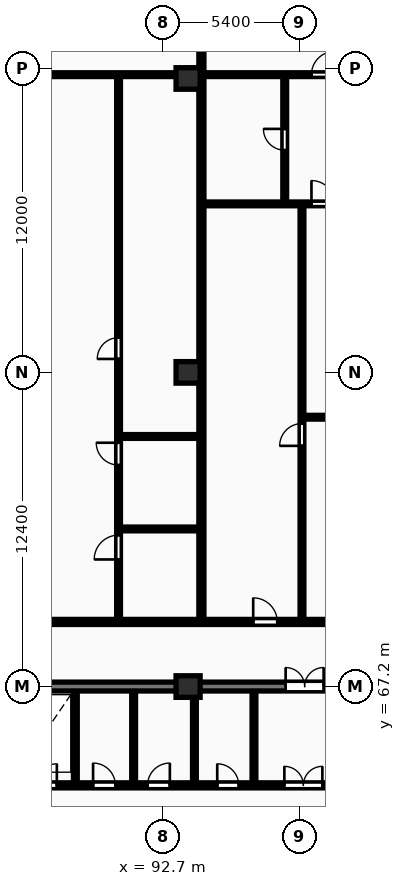
"""IFC4 building model, lengths in metres.
Left out: names, types, materials, properties, quantities, classifications, styles, units other than length and angle.
Written with IfcOpenShell. Run it as: python <this file> out.ifc"""

import sys

from ifc_helpers import new_model, si_unit, direction, frame, frame_2d, origin, origin_2d, place, context, subcontext, project, spatial, rectangle, extrude, element, fill, save


model = new_model("IFC4")
c1 = context("Model", 3, precision=1e-05, world=origin(), true_north=direction((0.0, 1.0)))
c2 = subcontext(c1, "Body", "Model", "MODEL_VIEW")
j1 = project(units=[si_unit("LENGTHUNIT", "METRE"), si_unit("PLANEANGLEUNIT", "RADIAN")], contexts=[c1])
p1 = place(None, origin())
s1 = spatial("IfcSite", under=j1, at=p1, CompositionType="ELEMENT")
p2 = place(p1, origin())
s2 = spatial("IfcBuilding", under=s1, at=p2, CompositionType="ELEMENT")
p3 = place(p2, frame((0.0, 0.0, 100.3)))
s3 = spatial("IfcBuildingStorey", under=s2, at=p3, CompositionType="ELEMENT", Elevation=100.3)
for number, where, z_axis, x_axis in (
    (1, (93.7, 67.2, 0.0), (0.0, 0.0, 1.0), (1.0, 0.0, 0.0)),
    (2, (93.7, 79.6, 0.0), (0.0, 0.0, 1.0), (1.0, 0.0, 0.0)),
    (3, (93.7, 91.2, 0.0), (0.0, 0.0, 1.0), (1.0, 0.0, 0.0)),
):
    element("IfcColumn", number, at=place(p3, frame(where, z_axis=z_axis, x_axis=x_axis)), inside=s3, PredefinedType="COLUMN", context=c2, shape_type="SweptSolid", body=[
        extrude(rectangle(XDim=0.95, YDim=0.85, at=origin_2d()), origin(), (0.0, 0.0, 1.0), 3.25),
    ])
p4 = place(p3, frame((75.95, 67.2, 0.0), z_axis=(0.0, 0.0, 1.0), x_axis=(1.0, 0.0, 0.0)))
e4 = element("IfcWall", 4, at=p4, inside=s3, PredefinedType="SHEAR", context=c2, shape_type="SweptSolid", body=[
    extrude(rectangle(XDim=36.3, YDim=0.35, at=frame_2d((18.15, 0.0))), origin(), (0.0, 0.0, 1.0), 3.25),
])
p5 = place(p4, frame((5.25, 0.0, 0.0)))
e5 = element("IfcOpeningElement", 5, at=p5, cuts=e4, PredefinedType="OPENING", context=c2, shape_type="SweptSolid", body=[
    extrude(rectangle(XDim=1.0, YDim=2.15, at=frame_2d((0.5, 1.075))), frame((0.0, 0.185, 0.0), z_axis=(0.0, -1.0, 0.0), x_axis=(1.0, 0.0, 0.0)), (0.0, 0.0, 1.0), 0.37),
])
p6 = place(p4, frame((21.6, 0.0, 0.0)))
e6 = element("IfcOpeningElement", 6, at=p6, cuts=e4, PredefinedType="OPENING", context=c2, shape_type="SweptSolid", body=[
    extrude(rectangle(XDim=1.5, YDim=2.2, at=frame_2d((0.75, 1.1))), frame((0.0, 0.185, 0.0), z_axis=(0.0, -1.0, 0.0), x_axis=(1.0, 0.0, 0.0)), (0.0, 0.0, 1.0), 0.37),
])
p7 = place(p4, frame((30.45, 0.0, 0.0)))
e7 = element("IfcOpeningElement", 7, at=p7, cuts=e4, PredefinedType="OPENING", context=c2, shape_type="SweptSolid", body=[
    extrude(rectangle(XDim=1.0, YDim=2.15, at=frame_2d((0.5, 1.075))), frame((0.0, 0.185, 0.0), z_axis=(0.0, -1.0, 0.0), x_axis=(1.0, 0.0, 0.0)), (0.0, 0.0, 1.0), 0.37),
])
for number, where, z_axis, x_axis in (
    (8, (89.25, 63.4, 0.0), (0.0, 0.0, 1.0), (0.0, 1.0, 0.0)),
    (9, (91.55, 63.4, 0.0), (0.0, 0.0, 1.0), (0.0, 1.0, 0.0)),
):
    element("IfcWall", number, at=place(p3, frame(where, z_axis=z_axis, x_axis=x_axis)), inside=s3, PredefinedType="PARTITIONING", context=c2, shape_type="SweptSolid", body=[
        extrude(rectangle(XDim=3.6, YDim=0.15, at=frame_2d((1.8, 0.0))), origin(), (0.0, 0.0, 1.0), 2.97),
    ])
p8 = place(p3, frame((93.95, 63.4, 0.0), z_axis=(0.0, 0.0, 1.0), x_axis=(0.0, 1.0, 0.0)))
e10 = element("IfcWall", 10, at=p8, inside=s3, PredefinedType="PARTITIONING", context=c2, shape_type="SweptSolid", body=[
    extrude(rectangle(XDim=3.6, YDim=0.15, at=frame_2d((1.8, 0.0))), origin(), (0.0, 0.0, 1.0), 2.277),
])
p9 = place(p3, frame((96.3, 63.4, 0.0), z_axis=(0.0, 0.0, 1.0), x_axis=(0.0, 1.0, 0.0)))
e11 = element("IfcWall", 11, at=p9, inside=s3, PredefinedType="PARTITIONING", context=c2, shape_type="SweptSolid", body=[
    extrude(rectangle(XDim=3.6, YDim=0.15, at=frame_2d((1.8, 0.0))), origin(), (0.0, 0.0, 1.0), 2.97),
])
p10 = place(p3, frame((84.42, 63.3, 0.0), z_axis=(0.0, 0.0, 1.0), x_axis=(1.0, 0.0, 0.0)))
e12 = element("IfcWall", 12, at=p10, inside=s3, PredefinedType="PARTITIONING", context=c2, shape_type="SweptSolid", body=[
    extrude(rectangle(XDim=19.83, YDim=0.2, at=frame_2d((9.915, 0.0))), origin(), (0.0, 0.0, 1.0), 2.97),
])
p11 = place(p10, frame((1.15, 0.0, 0.0)))
e13 = element("IfcOpeningElement", 13, at=p11, cuts=e12, PredefinedType="OPENING", context=c2, shape_type="SweptSolid", body=[
    extrude(rectangle(XDim=0.85, YDim=2.05, at=frame_2d((0.425, 1.025))), frame((0.0, 0.11, 0.0), z_axis=(0.0, -1.0, 0.0), x_axis=(1.0, 0.0, 0.0)), (0.0, 0.0, 1.0), 0.22),
])
p12 = place(p10, frame((3.25, 0.0, 0.0)))
e14 = element("IfcOpeningElement", 14, at=p12, cuts=e12, PredefinedType="OPENING", context=c2, shape_type="SweptSolid", body=[
    extrude(rectangle(XDim=0.85, YDim=2.05, at=frame_2d((0.425, 1.025))), frame((0.0, 0.11, 0.0), z_axis=(0.0, -1.0, 0.0), x_axis=(1.0, 0.0, 0.0)), (0.0, 0.0, 1.0), 0.22),
])
p13 = place(p10, frame((13.08, 0.0, 0.0)))
e15 = element("IfcOpeningElement", 15, at=p13, cuts=e12, PredefinedType="OPENING", context=c2, shape_type="SweptSolid", body=[
    extrude(rectangle(XDim=1.5, YDim=2.2, at=frame_2d((0.75, 1.1))), frame((0.0, 0.11, 0.0), z_axis=(0.0, -1.0, 0.0), x_axis=(1.0, 0.0, 0.0)), (0.0, 0.0, 1.0), 0.22),
])
p14 = place(p10, frame((5.53, 0.0, 0.0)))
e16 = element("IfcOpeningElement", 16, at=p14, cuts=e12, PredefinedType="OPENING", context=c2, shape_type="SweptSolid", body=[
    extrude(rectangle(XDim=0.88, YDim=2.06, at=frame_2d((0.44, 1.03))), frame((0.0, 0.11, 0.0), z_axis=(0.0, -1.0, 0.0), x_axis=(1.0, 0.0, 0.0)), (0.0, 0.0, 1.0), 0.22),
])
p15 = place(p10, frame((7.68, 0.0, 0.0)))
e17 = element("IfcOpeningElement", 17, at=p15, cuts=e12, PredefinedType="OPENING", context=c2, shape_type="SweptSolid", body=[
    extrude(rectangle(XDim=0.88, YDim=2.06, at=frame_2d((0.44, 1.03))), frame((0.0, 0.11, 0.0), z_axis=(0.0, -1.0, 0.0), x_axis=(1.0, 0.0, 0.0)), (0.0, 0.0, 1.0), 0.22),
])
p16 = place(p10, frame((10.43, 0.0, 0.0)))
e18 = element("IfcOpeningElement", 18, at=p16, cuts=e12, PredefinedType="OPENING", context=c2, shape_type="SweptSolid", body=[
    extrude(rectangle(XDim=0.85, YDim=2.05, at=frame_2d((0.425, 1.025))), frame((0.0, 0.11, 0.0), z_axis=(0.0, -1.0, 0.0), x_axis=(1.0, 0.0, 0.0)), (0.0, 0.0, 1.0), 0.22),
])
p17 = place(p10, frame((16.23, 0.0, 0.0)))
e19 = element("IfcOpeningElement", 19, at=p17, cuts=e12, PredefinedType="OPENING", context=c2, shape_type="SweptSolid", body=[
    extrude(rectangle(XDim=0.96, YDim=2.1, at=frame_2d((0.48, 1.05))), frame((0.0, 0.11, 0.0), z_axis=(0.0, -1.0, 0.0), x_axis=(1.0, 0.0, 0.0)), (0.0, 0.0, 1.0), 0.22),
])
p18 = place(p10, frame((18.68, 0.0, 0.0)))
e20 = element("IfcOpeningElement", 20, at=p18, cuts=e12, PredefinedType="OPENING", context=c2, shape_type="SweptSolid", body=[
    extrude(rectangle(XDim=0.84, YDim=2.04, at=frame_2d((0.42, 1.02))), frame((0.0, 0.11, 0.0), z_axis=(0.0, -1.0, 0.0), x_axis=(1.0, 0.0, 0.0)), (0.0, 0.0, 1.0), 0.22),
])
p19 = place(p3, frame((94.225, 69.83, 0.0), z_axis=(0.0, 0.0, 1.0), x_axis=(0.0, 1.0, 0.0)))
e21 = element("IfcWall", 21, at=p19, inside=s3, PredefinedType="PARTITIONING", context=c2, shape_type="SweptSolid", body=[
    extrude(rectangle(XDim=26.07, YDim=0.2, at=frame_2d((13.035, 0.0))), origin(), (0.0, 0.0, 1.0), 2.97),
])
for number, where, z_axis, x_axis in (
    (22, (91.015, 73.42, 0.0), (0.0, 0.0, 1.0), (1.0, 0.0, 0.0)),
    (23, (91.015, 77.07, 0.0), (0.0, 0.0, 1.0), (1.0, 0.0, 0.0)),
):
    element("IfcWall", number, at=place(p3, frame(where, z_axis=z_axis, x_axis=x_axis)), inside=s3, PredefinedType="PARTITIONING", context=c2, shape_type="SweptSolid", body=[
        extrude(rectangle(XDim=3.13, YDim=0.15, at=frame_2d((1.565, 0.0))), origin(), (0.0, 0.0, 1.0), 2.97),
    ])
p20 = place(p3, frame((90.955, 69.81, 0.0), z_axis=(0.0, 0.0, 1.0), x_axis=(0.0, 1.0, 0.0)))
e24 = element("IfcWall", 24, at=p20, inside=s3, PredefinedType="PARTITIONING", context=c2, shape_type="SweptSolid", body=[
    extrude(rectangle(XDim=21.48, YDim=0.15, at=frame_2d((10.74, 0.0))), origin(), (0.0, 0.0, 1.0), 2.97),
])
p21 = place(p20, frame((2.406, 0.0, 0.0)))
e25 = element("IfcOpeningElement", 25, at=p21, cuts=e24, PredefinedType="OPENING", context=c2, shape_type="SweptSolid", body=[
    extrude(rectangle(XDim=0.96, YDim=2.1, at=frame_2d((0.48, 1.05))), frame((0.0, 0.085, 0.0), z_axis=(0.0, -1.0, 0.0), x_axis=(1.0, 0.0, 0.0)), (0.0, 0.0, 1.0), 0.17),
])
p22 = place(p20, frame((6.133, 0.0, 0.0)))
e26 = element("IfcOpeningElement", 26, at=p22, cuts=e24, PredefinedType="OPENING", context=c2, shape_type="SweptSolid", body=[
    extrude(rectangle(XDim=0.88, YDim=2.06, at=frame_2d((0.44, 1.03))), frame((0.0, 0.085, 0.0), z_axis=(0.0, -1.0, 0.0), x_axis=(1.0, 0.0, 0.0)), (0.0, 0.0, 1.0), 0.17),
])
p23 = place(p20, frame((10.32, 0.0, 0.0)))
e27 = element("IfcOpeningElement", 27, at=p23, cuts=e24, PredefinedType="OPENING", context=c2, shape_type="SweptSolid", body=[
    extrude(rectangle(XDim=0.84, YDim=2.04, at=frame_2d((0.42, 1.02))), frame((0.0, 0.085, 0.0), z_axis=(0.0, -1.0, 0.0), x_axis=(1.0, 0.0, 0.0)), (0.0, 0.0, 1.0), 0.17),
])
p24 = place(p3, frame((75.712, 91.35, 0.0), z_axis=(0.0, 0.0, 1.0), x_axis=(1.0, 0.0, 0.0)))
e28 = element("IfcWall", 28, at=p24, inside=s3, PredefinedType="PARTITIONING", context=c2, shape_type="SweptSolid", body=[
    extrude(rectangle(XDim=18.433, YDim=0.15, at=frame_2d((9.216, 0.0))), origin(), (0.0, 0.0, 1.0), 2.663),
])
p25 = place(p24, frame((6.074, 0.0, 0.0)))
e29 = element("IfcOpeningElement", 29, at=p25, cuts=e28, PredefinedType="OPENING", context=c2, shape_type="SweptSolid", body=[
    extrude(rectangle(XDim=0.94, YDim=2.1, at=frame_2d((0.47, 1.05))), frame((0.0, 0.085, 0.0), z_axis=(0.0, -1.0, 0.0), x_axis=(1.0, 0.0, 0.0)), (0.0, 0.0, 1.0), 0.17),
])
p26 = place(p24, frame((10.518, 0.0, 0.0)))
e30 = element("IfcOpeningElement", 30, at=p26, cuts=e28, PredefinedType="OPENING", context=c2, shape_type="SweptSolid", body=[
    extrude(rectangle(XDim=0.94, YDim=2.1, at=frame_2d((0.47, 1.05))), frame((0.0, 0.085, 0.0), z_axis=(0.0, -1.0, 0.0), x_axis=(1.0, 0.0, 0.0)), (0.0, 0.0, 1.0), 0.17),
])
p27 = place(p3, frame((98.255, 77.83, 0.0), z_axis=(0.0, 0.0, 1.0), x_axis=(1.0, 0.0, 0.0)))
e31 = element("IfcWall", 31, at=p27, inside=s3, PredefinedType="PARTITIONING", context=c2, shape_type="SweptSolid", body=[
    extrude(rectangle(XDim=5.499, YDim=0.15, at=frame_2d((2.75, 0.0))), origin(), (0.0, 0.0, 1.0), 2.97),
])
p28 = place(p27, frame((2.074, 0.0, 0.0)))
e32 = element("IfcOpeningElement", 32, at=p28, cuts=e31, PredefinedType="OPENING", context=c2, shape_type="SweptSolid", body=[
    extrude(rectangle(XDim=0.88, YDim=2.06, at=frame_2d((0.44, 1.03))), frame((0.0, 0.085, 0.0), z_axis=(0.0, -1.0, 0.0), x_axis=(1.0, 0.0, 0.0)), (0.0, 0.0, 1.0), 0.17),
])
p29 = place(p3, frame((98.195, 69.81, 0.0), z_axis=(0.0, 0.0, 1.0), x_axis=(0.0, 1.0, 0.0)))
e33 = element("IfcWall", 33, at=p29, inside=s3, PredefinedType="PARTITIONING", context=c2, shape_type="SweptSolid", body=[
    extrude(rectangle(XDim=16.4, YDim=0.15, at=frame_2d((8.2, 0.0))), origin(), (0.0, 0.0, 1.0), 2.97),
])
p30 = place(p29, frame((6.89, 0.0, 0.0)))
e34 = element("IfcOpeningElement", 34, at=p30, cuts=e33, PredefinedType="OPENING", context=c2, shape_type="SweptSolid", body=[
    extrude(rectangle(XDim=0.88, YDim=2.06, at=frame_2d((0.44, 1.03))), frame((0.0, 0.085, 0.0), z_axis=(0.0, -1.0, 0.0), x_axis=(1.0, 0.0, 0.0)), (0.0, 0.0, 1.0), 0.17),
])
p31 = place(p3, frame((97.514, 86.29, 0.0), z_axis=(0.0, 0.0, 1.0), x_axis=(0.0, 1.0, 0.0)))
e35 = element("IfcWall", 35, at=p31, inside=s3, PredefinedType="PARTITIONING", context=c2, shape_type="SweptSolid", body=[
    extrude(rectangle(XDim=5.0, YDim=0.15, at=frame_2d((2.5, 0.0))), origin(), (0.0, 0.0, 1.0), 2.97),
])
p32 = place(p31, frame((2.08, 0.0, 0.0)))
e36 = element("IfcOpeningElement", 36, at=p32, cuts=e35, PredefinedType="OPENING", context=c2, shape_type="SweptSolid", body=[
    extrude(rectangle(XDim=0.84, YDim=2.04, at=frame_2d((0.42, 1.02))), frame((0.0, 0.085, 0.0), z_axis=(0.0, -1.0, 0.0), x_axis=(1.0, 0.0, 0.0)), (0.0, 0.0, 1.0), 0.17),
])
p33 = place(p3, frame((94.305, 86.25, 0.0), z_axis=(0.0, 0.0, 1.0), x_axis=(1.0, 0.0, 0.0)))
e37 = element("IfcWall", 37, at=p33, inside=s3, PredefinedType="PARTITIONING", context=c2, shape_type="SweptSolid", body=[
    extrude(rectangle(XDim=9.449, YDim=0.15, at=frame_2d((4.725, 0.0))), origin(), (0.0, 0.0, 1.0), 2.97),
])
p34 = place(p33, frame((4.264, 0.0, 0.0)))
e38 = element("IfcOpeningElement", 38, at=p34, cuts=e37, PredefinedType="OPENING", context=c2, shape_type="SweptSolid", body=[
    extrude(rectangle(XDim=0.92, YDim=2.08, at=frame_2d((0.46, 1.04))), frame((0.0, 0.085, 0.0), z_axis=(0.0, -1.0, 0.0), x_axis=(1.0, 0.0, 0.0)), (0.0, 0.0, 1.0), 0.17),
])
p35 = place(p3, frame((94.305, 91.35, 0.0), z_axis=(0.0, 0.0, 1.0), x_axis=(1.0, 0.0, 0.0)))
e39 = element("IfcWall", 39, at=p35, inside=s3, PredefinedType="PARTITIONING", context=c2, shape_type="SweptSolid", body=[
    extrude(rectangle(XDim=9.449, YDim=0.15, at=frame_2d((4.725, 0.0))), origin(), (0.0, 0.0, 1.0), 2.663),
])
p36 = place(p35, frame((4.264, 0.0, 0.0)))
e40 = element("IfcOpeningElement", 40, at=p36, cuts=e39, PredefinedType="OPENING", context=c2, shape_type="SweptSolid", body=[
    extrude(rectangle(XDim=0.92, YDim=2.08, at=frame_2d((0.46, 1.04))), frame((0.0, 0.085, 0.0), z_axis=(0.0, -1.0, 0.0), x_axis=(1.0, 0.0, 0.0)), (0.0, 0.0, 1.0), 0.17),
])
p37 = place(p3, frame((57.6, 69.75, 0.0), z_axis=(0.0, 0.0, 1.0), x_axis=(1.0, 0.0, 0.0)))
e41 = element("IfcWall", 41, at=p37, inside=s3, PredefinedType="PARTITIONING", context=c2, shape_type="SweptSolid", body=[
    extrude(rectangle(XDim=73.0, YDim=0.2, at=frame_2d((36.5, 0.0))), origin(), (0.0, 0.0, 1.0), 2.97),
])
p38 = place(p37, frame((7.326, 0.0, 0.0)))
e42 = element("IfcOpeningElement", 42, at=p38, cuts=e41, PredefinedType="OPENING", context=c2, shape_type="SweptSolid", body=[
    extrude(rectangle(XDim=1.22, YDim=2.18, at=frame_2d((0.61, 1.09))), frame((0.0, 0.11, 0.0), z_axis=(0.0, -1.0, 0.0), x_axis=(1.0, 0.0, 0.0)), (0.0, 0.0, 1.0), 0.22),
])
p39 = place(p37, frame((23.795, 0.0, 0.0)))
e43 = element("IfcOpeningElement", 43, at=p39, cuts=e41, PredefinedType="OPENING", context=c2, shape_type="SweptSolid", body=[
    extrude(rectangle(XDim=1.22, YDim=2.18, at=frame_2d((0.61, 1.09))), frame((0.0, 0.11, 0.0), z_axis=(0.0, -1.0, 0.0), x_axis=(1.0, 0.0, 0.0)), (0.0, 0.0, 1.0), 0.22),
])
p40 = place(p37, frame((38.67, 0.0, 0.0)))
e44 = element("IfcOpeningElement", 44, at=p40, cuts=e41, PredefinedType="OPENING", context=c2, shape_type="SweptSolid", body=[
    extrude(rectangle(XDim=0.95, YDim=2.15, at=frame_2d((0.475, 1.075))), frame((0.0, 0.11, 0.0), z_axis=(0.0, -1.0, 0.0), x_axis=(1.0, 0.0, 0.0)), (0.0, 0.0, 1.0), 0.22),
])
p41 = place(p37, frame((48.279, 0.0, 0.0)))
e45 = element("IfcOpeningElement", 45, at=p41, cuts=e41, PredefinedType="OPENING", context=c2, shape_type="SweptSolid", body=[
    extrude(rectangle(XDim=0.95, YDim=2.15, at=frame_2d((0.475, 1.075))), frame((0.0, 0.11, 0.0), z_axis=(0.0, -1.0, 0.0), x_axis=(1.0, 0.0, 0.0)), (0.0, 0.0, 1.0), 0.22),
])
p42 = place(p37, frame((58.449, 0.0, 0.0)))
e46 = element("IfcOpeningElement", 46, at=p42, cuts=e41, PredefinedType="OPENING", context=c2, shape_type="SweptSolid", body=[
    extrude(rectangle(XDim=0.95, YDim=2.15, at=frame_2d((0.475, 1.075))), frame((0.0, 0.11, 0.0), z_axis=(0.0, -1.0, 0.0), x_axis=(1.0, 0.0, 0.0)), (0.0, 0.0, 1.0), 0.22),
])
p43 = place(p6, origin())
e47 = element("IfcDoor", 47, at=p43, inside=s3, OperationType="DOUBLE_DOOR_SINGLE_SWING", PredefinedType="DOOR", context=c2, shape_type="SweptSolid", body=[
    extrude(rectangle(XDim=1.5, YDim=2.2, at=frame_2d((0.75, 1.1))), frame((0.0, 0.025, 0.0), z_axis=(0.0, -1.0, 0.0), x_axis=(1.0, 0.0, 0.0)), (0.0, 0.0, 1.0), 0.05),
])
fill(e6, e47)
p44 = place(p12, origin())
e48 = element("IfcDoor", 48, at=p44, inside=s3, OperationType="SINGLE_SWING_RIGHT", PredefinedType="DOOR", context=c2, shape_type="SweptSolid", body=[
    extrude(rectangle(XDim=0.85, YDim=2.05, at=frame_2d((0.425, 1.025))), frame((0.0, 0.025, 0.0), z_axis=(0.0, -1.0, 0.0), x_axis=(1.0, 0.0, 0.0)), (0.0, 0.0, 1.0), 0.05),
])
fill(e14, e48)
p45 = place(p13, origin())
e49 = element("IfcDoor", 49, at=p45, inside=s3, OperationType="DOUBLE_DOOR_SINGLE_SWING", PredefinedType="DOOR", context=c2, shape_type="SweptSolid", body=[
    extrude(rectangle(XDim=1.5, YDim=2.2, at=frame_2d((0.75, 1.1))), frame((0.0, 0.025, 0.0), z_axis=(0.0, -1.0, 0.0), x_axis=(1.0, 0.0, 0.0)), (0.0, 0.0, 1.0), 0.05),
])
fill(e15, e49)
p46 = place(p14, origin())
e50 = element("IfcDoor", 50, at=p46, inside=s3, OperationType="SINGLE_SWING_LEFT", PredefinedType="DOOR", context=c2, shape_type="SweptSolid", body=[
    extrude(rectangle(XDim=0.88, YDim=2.06, at=frame_2d((0.44, 1.03))), frame((0.0, 0.025, 0.0), z_axis=(0.0, -1.0, 0.0), x_axis=(1.0, 0.0, 0.0)), (0.0, 0.0, 1.0), 0.05),
])
fill(e16, e50)
p47 = place(p15, origin())
e51 = element("IfcDoor", 51, at=p47, inside=s3, OperationType="SINGLE_SWING_RIGHT", PredefinedType="DOOR", context=c2, shape_type="SweptSolid", body=[
    extrude(rectangle(XDim=0.88, YDim=2.06, at=frame_2d((0.44, 1.03))), frame((0.0, 0.025, 0.0), z_axis=(0.0, -1.0, 0.0), x_axis=(1.0, 0.0, 0.0)), (0.0, 0.0, 1.0), 0.05),
])
fill(e17, e51)
p48 = place(p16, origin())
e52 = element("IfcDoor", 52, at=p48, inside=s3, OperationType="SINGLE_SWING_LEFT", PredefinedType="DOOR", context=c2, shape_type="SweptSolid", body=[
    extrude(rectangle(XDim=0.85, YDim=2.05, at=frame_2d((0.425, 1.025))), frame((0.0, 0.025, 0.0), z_axis=(0.0, -1.0, 0.0), x_axis=(1.0, 0.0, 0.0)), (0.0, 0.0, 1.0), 0.05),
])
fill(e18, e52)
p49 = place(p21, origin())
e53 = element("IfcDoor", 53, at=p49, inside=s3, OperationType="SINGLE_SWING_LEFT", PredefinedType="DOOR", context=c2, shape_type="SweptSolid", body=[
    extrude(rectangle(XDim=0.96, YDim=2.1, at=frame_2d((0.48, 1.05))), frame((0.0, 0.025, 0.0), z_axis=(0.0, -1.0, 0.0), x_axis=(1.0, 0.0, 0.0)), (0.0, 0.0, 1.0), 0.05),
])
fill(e25, e53)
p50 = place(p22, origin())
e54 = element("IfcDoor", 54, at=p50, inside=s3, OperationType="SINGLE_SWING_RIGHT", PredefinedType="DOOR", context=c2, shape_type="SweptSolid", body=[
    extrude(rectangle(XDim=0.88, YDim=2.06, at=frame_2d((0.44, 1.03))), frame((0.0, 0.025, 0.0), z_axis=(0.0, -1.0, 0.0), x_axis=(1.0, 0.0, 0.0)), (0.0, 0.0, 1.0), 0.05),
])
fill(e26, e54)
p51 = place(p23, origin())
e55 = element("IfcDoor", 55, at=p51, inside=s3, OperationType="SINGLE_SWING_LEFT", PredefinedType="DOOR", context=c2, shape_type="SweptSolid", body=[
    extrude(rectangle(XDim=0.84, YDim=2.04, at=frame_2d((0.42, 1.02))), frame((0.0, 0.025, 0.0), z_axis=(0.0, -1.0, 0.0), x_axis=(1.0, 0.0, 0.0)), (0.0, 0.0, 1.0), 0.05),
])
fill(e27, e55)
p52 = place(p30, origin())
e56 = element("IfcDoor", 56, at=p52, inside=s3, OperationType="SINGLE_SWING_LEFT", PredefinedType="DOOR", context=c2, shape_type="SweptSolid", body=[
    extrude(rectangle(XDim=0.88, YDim=2.06, at=frame_2d((0.44, 1.03))), frame((0.0, 0.025, 0.0), z_axis=(0.0, -1.0, 0.0), x_axis=(1.0, 0.0, 0.0)), (0.0, 0.0, 1.0), 0.05),
])
fill(e34, e56)
p53 = place(p32, origin())
e57 = element("IfcDoor", 57, at=p53, inside=s3, OperationType="SINGLE_SWING_RIGHT", PredefinedType="DOOR", context=c2, shape_type="SweptSolid", body=[
    extrude(rectangle(XDim=0.84, YDim=2.04, at=frame_2d((0.42, 1.02))), frame((0.0, 0.025, 0.0), z_axis=(0.0, -1.0, 0.0), x_axis=(1.0, 0.0, 0.0)), (0.0, 0.0, 1.0), 0.05),
])
fill(e36, e57)
p54 = place(p34, origin())
e58 = element("IfcDoor", 58, at=p54, inside=s3, OperationType="SINGLE_SWING_LEFT", PredefinedType="DOOR", context=c2, shape_type="SweptSolid", body=[
    extrude(rectangle(XDim=0.92, YDim=2.08, at=frame_2d((0.46, 1.04))), frame((0.0, 0.025, 0.0), z_axis=(0.0, -1.0, 0.0), x_axis=(1.0, 0.0, 0.0)), (0.0, 0.0, 1.0), 0.05),
])
fill(e38, e58)
p55 = place(p36, origin())
e59 = element("IfcDoor", 59, at=p55, inside=s3, OperationType="SINGLE_SWING_RIGHT", PredefinedType="DOOR", context=c2, shape_type="SweptSolid", body=[
    extrude(rectangle(XDim=0.92, YDim=2.08, at=frame_2d((0.46, 1.04))), frame((0.0, 0.025, 0.0), z_axis=(0.0, -1.0, 0.0), x_axis=(1.0, 0.0, 0.0)), (0.0, 0.0, 1.0), 0.05),
])
fill(e40, e59)
p56 = place(p40, origin())
e60 = element("IfcDoor", 60, at=p56, inside=s3, OperationType="SINGLE_SWING_LEFT", PredefinedType="DOOR", context=c2, shape_type="SweptSolid", body=[
    extrude(rectangle(XDim=0.95, YDim=2.15, at=frame_2d((0.475, 1.075))), frame((0.0, 0.025, 0.0), z_axis=(0.0, -1.0, 0.0), x_axis=(1.0, 0.0, 0.0)), (0.0, 0.0, 1.0), 0.05),
])
fill(e44, e60)
save(model, sys.argv[1])
